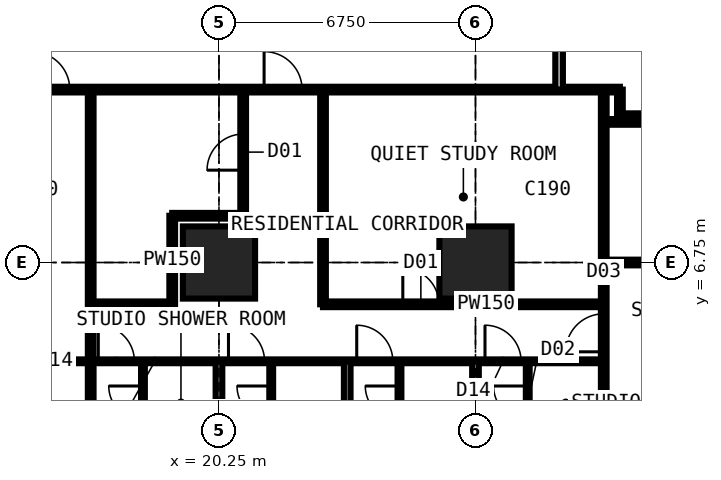
"""IFC4 building model, lengths in metres.
Left out: names, types, materials, properties, quantities, classifications, styles, units other than length and angle.
Written with IfcOpenShell. Run it as: python <this file> out.ifc"""

import sys

from ifc_helpers import new_model, si_unit, direction, frame, frame_2d, origin, origin_2d, place, context, subcontext, project, spatial, rectangle, extrude, element, fill, save


model = new_model("IFC4")
c1 = context("Model", 3, precision=1e-05, world=origin(), true_north=direction((0.0, 1.0)))
c2 = subcontext(c1, "Body", "Model", "MODEL_VIEW")
j1 = project(units=[si_unit("LENGTHUNIT", "METRE"), si_unit("PLANEANGLEUNIT", "RADIAN")], contexts=[c1])
p1 = place(None, origin())
s1 = spatial("IfcSite", under=j1, at=p1, CompositionType="ELEMENT")
p2 = place(p1, origin())
s2 = spatial("IfcBuilding", under=s1, at=p2, CompositionType="ELEMENT")
p3 = place(p2, frame((0.0, 0.0, 36.0)))
s3 = spatial("IfcBuildingStorey", under=s2, at=p3, CompositionType="ELEMENT", Elevation=36.0)
for number, where, z_axis, x_axis in (
    (1, (20.25, 6.75, 0.0), (0.0, 0.0, 1.0), (1.0, 0.0, 0.0)),
    (2, (27.0, 6.75, 0.0), (0.0, 0.0, 1.0), (1.0, 0.0, 0.0)),
):
    element("IfcColumn", number, at=place(p3, frame(where, z_axis=z_axis, x_axis=x_axis)), inside=s3, PredefinedType="COLUMN", context=c2, shape_type="SweptSolid", body=[
        extrude(rectangle(XDim=1.9, YDim=1.9, at=origin_2d()), origin(), (0.0, 0.0, 1.0), 3.6),
    ])
p4 = place(p3, frame((6.75, 4.15, 0.0), z_axis=(0.0, 0.0, 1.0), x_axis=(1.0, 0.0, 0.0)))
e3 = element("IfcWall", 3, at=p4, inside=s3, PredefinedType="PARTITIONING", context=c2, shape_type="SweptSolid", body=[
    extrude(rectangle(XDim=23.625, YDim=0.1, at=frame_2d((11.812, 0.0))), origin(), (0.0, 0.0, 1.0), 3.375),
])
p5 = place(p4, frame((0.2, 0.0, 0.0)))
e4 = element("IfcOpeningElement", 4, at=p5, cuts=e3, PredefinedType="OPENING", context=c2, shape_type="SweptSolid", body=[
    extrude(rectangle(XDim=0.95, YDim=2.2, at=frame_2d((0.475, 1.1))), frame((0.0, 0.06, 0.0), z_axis=(0.0, -1.0, 0.0), x_axis=(1.0, 0.0, 0.0)), (0.0, 0.0, 1.0), 0.12),
])
p6 = place(p4, frame((3.625, 0.0, 0.0)))
e5 = element("IfcOpeningElement", 5, at=p6, cuts=e3, PredefinedType="OPENING", context=c2, shape_type="SweptSolid", body=[
    extrude(rectangle(XDim=0.95, YDim=2.2, at=frame_2d((0.475, 1.1))), frame((0.0, 0.06, 0.0), z_axis=(0.0, -1.0, 0.0), x_axis=(1.0, 0.0, 0.0)), (0.0, 0.0, 1.0), 0.12),
])
p7 = place(p4, frame((7.0, 0.0, 0.0)))
e6 = element("IfcOpeningElement", 6, at=p7, cuts=e3, PredefinedType="OPENING", context=c2, shape_type="SweptSolid", body=[
    extrude(rectangle(XDim=0.95, YDim=2.2, at=frame_2d((0.475, 1.1))), frame((0.0, 0.06, 0.0), z_axis=(0.0, -1.0, 0.0), x_axis=(1.0, 0.0, 0.0)), (0.0, 0.0, 1.0), 0.12),
])
p8 = place(p4, frame((10.325, 0.0, 0.0)))
e7 = element("IfcOpeningElement", 7, at=p8, cuts=e3, PredefinedType="OPENING", context=c2, shape_type="SweptSolid", body=[
    extrude(rectangle(XDim=0.95, YDim=2.2, at=frame_2d((0.475, 1.1))), frame((0.0, 0.06, 0.0), z_axis=(0.0, -1.0, 0.0), x_axis=(1.0, 0.0, 0.0)), (0.0, 0.0, 1.0), 0.12),
])
p9 = place(p4, frame((13.75, 0.0, 0.0)))
e8 = element("IfcOpeningElement", 8, at=p9, cuts=e3, PredefinedType="OPENING", context=c2, shape_type="SweptSolid", body=[
    extrude(rectangle(XDim=0.95, YDim=2.2, at=frame_2d((0.475, 1.1))), frame((0.0, 0.06, 0.0), z_axis=(0.0, -1.0, 0.0), x_axis=(1.0, 0.0, 0.0)), (0.0, 0.0, 1.0), 0.12),
])
p10 = place(p4, frame((17.125, 0.0, 0.0)))
e9 = element("IfcOpeningElement", 9, at=p10, cuts=e3, PredefinedType="OPENING", context=c2, shape_type="SweptSolid", body=[
    extrude(rectangle(XDim=0.95, YDim=2.2, at=frame_2d((0.475, 1.1))), frame((0.0, 0.06, 0.0), z_axis=(0.0, -1.0, 0.0), x_axis=(1.0, 0.0, 0.0)), (0.0, 0.0, 1.0), 0.12),
])
p11 = place(p4, frame((20.5, 0.0, 0.0)))
e10 = element("IfcOpeningElement", 10, at=p11, cuts=e3, PredefinedType="OPENING", context=c2, shape_type="SweptSolid", body=[
    extrude(rectangle(XDim=0.95, YDim=2.2, at=frame_2d((0.475, 1.1))), frame((0.0, 0.06, 0.0), z_axis=(0.0, -1.0, 0.0), x_axis=(1.0, 0.0, 0.0)), (0.0, 0.0, 1.0), 0.12),
])
p12 = place(p3, frame((10.125, 11.3, 0.0), z_axis=(0.0, 0.0, 1.0), x_axis=(1.0, 0.0, 0.0)))
e11 = element("IfcWall", 11, at=p12, inside=s3, PredefinedType="PARTITIONING", context=c2, shape_type="SweptSolid", body=[
    extrude(rectangle(XDim=20.675, YDim=0.15, at=frame_2d((10.337, 0.0))), origin(), (0.0, 0.0, 1.0), 3.375),
])
p13 = place(p12, frame((5.2, 0.0, 0.0)))
e12 = element("IfcOpeningElement", 12, at=p13, cuts=e11, PredefinedType="OPENING", context=c2, shape_type="SweptSolid", body=[
    extrude(rectangle(XDim=1.0, YDim=2.2, at=frame_2d((0.5, 1.1))), frame((0.0, 0.085, 0.0), z_axis=(0.0, -1.0, 0.0), x_axis=(1.0, 0.0, 0.0)), (0.0, 0.0, 1.0), 0.17),
])
p14 = place(p12, frame((11.312, 0.0, 0.0)))
e13 = element("IfcOpeningElement", 13, at=p14, cuts=e11, PredefinedType="OPENING", context=c2, shape_type="SweptSolid", body=[
    extrude(rectangle(XDim=1.0, YDim=2.2, at=frame_2d((0.5, 1.1))), frame((0.0, 0.085, 0.0), z_axis=(0.0, -1.0, 0.0), x_axis=(1.0, 0.0, 0.0)), (0.0, 0.0, 1.0), 0.17),
])
p15 = place(p12, frame((2.425, 0.0, 0.0)))
e14 = element("IfcOpeningElement", 14, at=p15, cuts=e11, PredefinedType="OPENING", context=c2, shape_type="SweptSolid", body=[
    extrude(rectangle(XDim=0.95, YDim=2.2, at=frame_2d((0.475, 1.1))), frame((0.0, 0.085, 0.0), z_axis=(0.0, -1.0, 0.0), x_axis=(1.0, 0.0, 0.0)), (0.0, 0.0, 1.0), 0.17),
])
p16 = place(p3, frame((16.875, -0.734, 0.0), z_axis=(0.0, 0.0, 1.0), x_axis=(0.0, 1.0, 0.0)))
e15 = element("IfcWall", 15, at=p16, inside=s3, PredefinedType="PARTITIONING", context=c2, shape_type="SweptSolid", body=[
    extrude(rectangle(XDim=12.034, YDim=0.15, at=frame_2d((6.017, 0.0))), origin(), (0.0, 0.0, 1.0), 3.375),
])
p17 = place(p3, frame((16.875, 5.65, 0.0), z_axis=(0.0, 0.0, 1.0), x_axis=(1.0, 0.0, 0.0)))
e16 = element("IfcWall", 16, at=p17, inside=s3, PredefinedType="PARTITIONING", context=c2, shape_type="SweptSolid", body=[
    extrude(rectangle(XDim=2.145, YDim=0.15, at=frame_2d((1.073, 0.0))), origin(), (0.0, 0.0, 1.0), 3.375),
])
p18 = place(p3, frame((18.25, 1.95, 0.0), z_axis=(0.0, 0.0, 1.0), x_axis=(0.0, 1.0, 0.0)))
e17 = element("IfcWall", 17, at=p18, inside=s3, PredefinedType="PARTITIONING", context=c2, shape_type="SweptSolid", body=[
    extrude(rectangle(XDim=2.2, YDim=0.1, at=frame_2d((1.1, 0.0))), origin(), (0.0, 0.0, 1.0), 3.375),
])
p19 = place(p18, frame((0.65, 0.0, 0.0)))
e18 = element("IfcOpeningElement", 18, at=p19, cuts=e17, PredefinedType="OPENING", context=c2, shape_type="SweptSolid", body=[
    extrude(rectangle(XDim=0.9, YDim=2.2, at=frame_2d((0.45, 1.1))), frame((0.0, 0.06, 0.0), z_axis=(0.0, -1.0, 0.0), x_axis=(1.0, 0.0, 0.0)), (0.0, 0.0, 1.0), 0.12),
])
p20 = place(p3, frame((19.02, 5.65, 0.0), z_axis=(0.0, 0.0, 1.0), x_axis=(0.0, 1.0, 0.0)))
e19 = element("IfcWall", 19, at=p20, inside=s3, PredefinedType="PARTITIONING", context=c2, shape_type="SweptSolid", body=[
    extrude(rectangle(XDim=2.33, YDim=0.15, at=frame_2d((1.165, 0.0))), origin(), (0.0, 0.0, 1.0), 3.375),
])
p21 = place(p3, frame((19.02, 7.98, 0.0), z_axis=(0.0, 0.0, 1.0), x_axis=(1.0, 0.0, 0.0)))
e20 = element("IfcWall", 20, at=p21, inside=s3, PredefinedType="PARTITIONING", context=c2, shape_type="SweptSolid", body=[
    extrude(rectangle(XDim=1.867, YDim=0.15, at=frame_2d((0.934, 0.0))), origin(), (0.0, 0.0, 1.0), 3.375),
])
p22 = place(p3, frame((20.25, -0.734, 0.0), z_axis=(0.0, 0.0, 1.0), x_axis=(0.0, 1.0, 0.0)))
e21 = element("IfcWall", 21, at=p22, inside=s3, PredefinedType="PARTITIONING", context=c2, shape_type="SweptSolid", body=[
    extrude(rectangle(XDim=4.884, YDim=0.175, at=frame_2d((2.442, 0.0))), origin(), (0.0, 0.0, 1.0), 2.61),
])
p23 = place(p3, frame((20.887, 7.98, 0.0), z_axis=(0.0, 0.0, 1.0), x_axis=(0.0, 1.0, 0.0)))
e22 = element("IfcWall", 22, at=p23, inside=s3, PredefinedType="PARTITIONING", context=c2, shape_type="SweptSolid", body=[
    extrude(rectangle(XDim=3.32, YDim=0.15, at=frame_2d((1.66, 0.0))), origin(), (0.0, 0.0, 1.0), 3.375),
])
p24 = place(p23, frame((1.2, 0.0, 0.0)))
e23 = element("IfcOpeningElement", 23, at=p24, cuts=e22, PredefinedType="OPENING", context=c2, shape_type="SweptSolid", body=[
    extrude(rectangle(XDim=0.95, YDim=2.2, at=frame_2d((0.475, 1.1))), frame((0.0, 0.085, 0.0), z_axis=(0.0, -1.0, 0.0), x_axis=(1.0, 0.0, 0.0)), (0.0, 0.0, 1.0), 0.17),
])
p25 = place(p3, frame((21.625, 1.95, 0.0), z_axis=(0.0, 0.0, 1.0), x_axis=(0.0, 1.0, 0.0)))
e24 = element("IfcWall", 24, at=p25, inside=s3, PredefinedType="PARTITIONING", context=c2, shape_type="SweptSolid", body=[
    extrude(rectangle(XDim=2.2, YDim=0.1, at=frame_2d((1.1, 0.0))), origin(), (0.0, 0.0, 1.0), 3.375),
])
p26 = place(p25, frame((0.65, 0.0, 0.0)))
e25 = element("IfcOpeningElement", 25, at=p26, cuts=e24, PredefinedType="OPENING", context=c2, shape_type="SweptSolid", body=[
    extrude(rectangle(XDim=0.9, YDim=2.2, at=frame_2d((0.45, 1.1))), frame((0.0, 0.06, 0.0), z_axis=(0.0, -1.0, 0.0), x_axis=(1.0, 0.0, 0.0)), (0.0, 0.0, 1.0), 0.12),
])
p27 = place(p3, frame((22.988, 5.65, 0.0), z_axis=(0.0, 0.0, 1.0), x_axis=(1.0, 0.0, 0.0)))
e26 = element("IfcWall", 26, at=p27, inside=s3, PredefinedType="PARTITIONING", context=c2, shape_type="SweptSolid", body=[
    extrude(rectangle(XDim=7.387, YDim=0.15, at=frame_2d((3.694, 0.0))), origin(), (0.0, 0.0, 1.0), 3.375),
])
p28 = place(p27, frame((2.1, 0.0, 0.0)))
e27 = element("IfcOpeningElement", 27, at=p28, cuts=e26, PredefinedType="OPENING", context=c2, shape_type="SweptSolid", body=[
    extrude(rectangle(XDim=0.95, YDim=2.2, at=frame_2d((0.475, 1.1))), frame((0.0, 0.085, 0.0), z_axis=(0.0, -1.0, 0.0), x_axis=(1.0, 0.0, 0.0)), (0.0, 0.0, 1.0), 0.17),
])
p29 = place(p3, frame((22.988, 5.65, 0.0), z_axis=(0.0, 0.0, 1.0), x_axis=(0.0, 1.0, 0.0)))
e28 = element("IfcWall", 28, at=p29, inside=s3, PredefinedType="PARTITIONING", context=c2, shape_type="SweptSolid", body=[
    extrude(rectangle(XDim=5.65, YDim=0.15, at=frame_2d((2.825, 0.0))), origin(), (0.0, 0.0, 1.0), 3.375),
])
p30 = place(p3, frame((23.625, -0.734, 0.0), z_axis=(0.0, 0.0, 1.0), x_axis=(0.0, 1.0, 0.0)))
e29 = element("IfcWall", 29, at=p30, inside=s3, PredefinedType="PARTITIONING", context=c2, shape_type="SweptSolid", body=[
    extrude(rectangle(XDim=4.884, YDim=0.175, at=frame_2d((2.442, 0.0))), origin(), (0.0, 0.0, 1.0), 3.375),
])
p31 = place(p3, frame((25.0, 1.95, 0.0), z_axis=(0.0, 0.0, 1.0), x_axis=(0.0, 1.0, 0.0)))
e30 = element("IfcWall", 30, at=p31, inside=s3, PredefinedType="PARTITIONING", context=c2, shape_type="SweptSolid", body=[
    extrude(rectangle(XDim=2.2, YDim=0.1, at=frame_2d((1.1, 0.0))), origin(), (0.0, 0.0, 1.0), 3.375),
])
p32 = place(p31, frame((0.65, 0.0, 0.0)))
e31 = element("IfcOpeningElement", 31, at=p32, cuts=e30, PredefinedType="OPENING", context=c2, shape_type="SweptSolid", body=[
    extrude(rectangle(XDim=0.9, YDim=2.2, at=frame_2d((0.45, 1.1))), frame((0.0, 0.06, 0.0), z_axis=(0.0, -1.0, 0.0), x_axis=(1.0, 0.0, 0.0)), (0.0, 0.0, 1.0), 0.12),
])
p33 = place(p3, frame((27.0, -0.734, 0.0), z_axis=(0.0, 0.0, 1.0), x_axis=(0.0, 1.0, 0.0)))
e32 = element("IfcWall", 32, at=p33, inside=s3, PredefinedType="PARTITIONING", context=c2, shape_type="SweptSolid", body=[
    extrude(rectangle(XDim=4.884, YDim=0.175, at=frame_2d((2.442, 0.0))), origin(), (0.0, 0.0, 1.0), 2.877),
])
p34 = place(p3, frame((28.375, 1.95, 0.0), z_axis=(0.0, 0.0, 1.0), x_axis=(0.0, 1.0, 0.0)))
e33 = element("IfcWall", 33, at=p34, inside=s3, PredefinedType="PARTITIONING", context=c2, shape_type="SweptSolid", body=[
    extrude(rectangle(XDim=2.2, YDim=0.1, at=frame_2d((1.1, 0.0))), origin(), (0.0, 0.0, 1.0), 3.375),
])
p35 = place(p34, frame((0.65, 0.0, 0.0)))
e34 = element("IfcOpeningElement", 34, at=p35, cuts=e33, PredefinedType="OPENING", context=c2, shape_type="SweptSolid", body=[
    extrude(rectangle(XDim=0.9, YDim=2.2, at=frame_2d((0.45, 1.1))), frame((0.0, 0.06, 0.0), z_axis=(0.0, -1.0, 0.0), x_axis=(1.0, 0.0, 0.0)), (0.0, 0.0, 1.0), 0.12),
])
p36 = place(p3, frame((29.2, 11.3, 0.0), z_axis=(0.0, 0.0, 1.0), x_axis=(0.0, 1.0, 0.0)))
e35 = element("IfcWall", 35, at=p36, inside=s3, PredefinedType="PARTITIONING", context=c2, shape_type="SweptSolid", body=[
    extrude(rectangle(XDim=17.9, YDim=0.2, at=frame_2d((8.95, 0.0))), origin(), (0.0, 0.0, 1.0), 3.375),
])
p37 = place(p36, frame((8.35, 0.0, 0.0)))
e36 = element("IfcOpeningElement", 36, at=p37, cuts=e35, PredefinedType="OPENING", context=c2, shape_type="SweptSolid", body=[
    extrude(rectangle(XDim=1.2, YDim=2.2, at=frame_2d((0.6, 1.1))), frame((0.0, 0.11, 0.0), z_axis=(0.0, -1.0, 0.0), x_axis=(1.0, 0.0, 0.0)), (0.0, 0.0, 1.0), 0.22),
])
p38 = place(p3, frame((30.375, -0.734, 0.0), z_axis=(0.0, 0.0, 1.0), x_axis=(0.0, 1.0, 0.0)))
e37 = element("IfcWall", 37, at=p38, inside=s3, PredefinedType="PARTITIONING", context=c2, shape_type="SweptSolid", body=[
    extrude(rectangle(XDim=12.034, YDim=0.15, at=frame_2d((6.017, 0.0))), origin(), (0.0, 0.0, 1.0), 3.375),
])
p39 = place(p38, frame((5.134, 0.0, 0.0)))
e38 = element("IfcOpeningElement", 38, at=p39, cuts=e37, PredefinedType="OPENING", context=c2, shape_type="SweptSolid", body=[
    extrude(rectangle(XDim=1.0, YDim=2.2, at=frame_2d((0.5, 1.1))), frame((0.0, 0.085, 0.0), z_axis=(0.0, -1.0, 0.0), x_axis=(1.0, 0.0, 0.0)), (0.0, 0.0, 1.0), 0.17),
])
p40 = place(p3, frame((30.375, 6.75, 0.0), z_axis=(0.0, 0.0, 1.0), x_axis=(1.0, 0.0, 0.0)))
e39 = element("IfcWall", 39, at=p40, inside=s3, PredefinedType="PARTITIONING", context=c2, shape_type="SweptSolid", body=[
    extrude(rectangle(XDim=5.975, YDim=0.15, at=frame_2d((2.988, 0.0))), origin(), (0.0, 0.0, 1.0), 2.877),
])
p41 = place(p3, frame((30.375, 10.45, 0.0), z_axis=(0.0, 0.0, 1.0), x_axis=(1.0, 0.0, 0.0)))
e40 = element("IfcWall", 40, at=p41, inside=s3, PredefinedType="PARTITIONING", context=c2, shape_type="SweptSolid", body=[
    extrude(rectangle(XDim=4.475, YDim=0.15, at=frame_2d((2.238, 0.0))), origin(), (0.0, 0.0, 1.0), 3.375),
])
p42 = place(p41, frame((2.35, 0.0, 0.0)))
e41 = element("IfcOpeningElement", 41, at=p42, cuts=e40, PredefinedType="OPENING", context=c2, shape_type="SweptSolid", body=[
    extrude(rectangle(XDim=0.95, YDim=2.2, at=frame_2d((0.475, 1.1))), frame((0.0, 0.085, 0.0), z_axis=(0.0, -1.0, 0.0), x_axis=(1.0, 0.0, 0.0)), (0.0, 0.0, 1.0), 0.17),
])
p43 = place(p3, frame((30.8, 10.6, 0.0), z_axis=(0.0, 0.0, 1.0), x_axis=(0.0, 1.0, 0.0)))
e42 = element("IfcWall", 42, at=p43, inside=s3, PredefinedType="PARTITIONING", context=c2, shape_type="SweptSolid", body=[
    extrude(rectangle(XDim=0.7, YDim=0.15, at=frame_2d((0.35, 0.0))), origin(), (0.0, 0.0, 1.0), 3.375),
])
p44 = place(p3, frame((30.8, 10.6, 0.0), z_axis=(0.0, 0.0, 1.0), x_axis=(1.0, 0.0, 0.0)))
e43 = element("IfcWall", 43, at=p44, inside=s3, PredefinedType="PARTITIONING", context=c2, shape_type="SweptSolid", body=[
    extrude(rectangle(XDim=1.85, YDim=0.15, at=frame_2d((0.925, 0.0))), origin(), (0.0, 0.0, 1.0), 3.375),
])
p45 = place(p13, origin())
e44 = element("IfcDoor", 44, at=p45, inside=s3, OperationType="SINGLE_SWING_LEFT", PredefinedType="DOOR", context=c2, shape_type="SweptSolid", body=[
    extrude(rectangle(XDim=1.0, YDim=2.2, at=frame_2d((0.5, 1.1))), frame((0.0, 0.025, 0.0), z_axis=(0.0, -1.0, 0.0), x_axis=(1.0, 0.0, 0.0)), (0.0, 0.0, 1.0), 0.05),
])
fill(e12, e44)
p46 = place(p8, origin())
e45 = element("IfcDoor", 45, at=p46, inside=s3, OperationType="SINGLE_SWING_LEFT", PredefinedType="DOOR", context=c2, shape_type="SweptSolid", body=[
    extrude(rectangle(XDim=0.95, YDim=2.2, at=frame_2d((0.475, 1.1))), frame((0.0, 0.025, 0.0), z_axis=(0.0, -1.0, 0.0), x_axis=(1.0, 0.0, 0.0)), (0.0, 0.0, 1.0), 0.05),
])
fill(e7, e45)
p47 = place(p19, origin())
e46 = element("IfcDoor", 46, at=p47, inside=s3, OperationType="SINGLE_SWING_RIGHT", PredefinedType="DOOR", context=c2, shape_type="SweptSolid", body=[
    extrude(rectangle(XDim=0.9, YDim=2.2, at=frame_2d((0.45, 1.1))), frame((0.0, 0.025, 0.0), z_axis=(0.0, -1.0, 0.0), x_axis=(1.0, 0.0, 0.0)), (0.0, 0.0, 1.0), 0.05),
])
fill(e18, e46)
p48 = place(p9, origin())
e47 = element("IfcDoor", 47, at=p48, inside=s3, OperationType="SINGLE_SWING_LEFT", PredefinedType="DOOR", context=c2, shape_type="SweptSolid", body=[
    extrude(rectangle(XDim=0.95, YDim=2.2, at=frame_2d((0.475, 1.1))), frame((0.0, 0.025, 0.0), z_axis=(0.0, -1.0, 0.0), x_axis=(1.0, 0.0, 0.0)), (0.0, 0.0, 1.0), 0.05),
])
fill(e8, e47)
p49 = place(p26, origin())
e48 = element("IfcDoor", 48, at=p49, inside=s3, OperationType="SINGLE_SWING_RIGHT", PredefinedType="DOOR", context=c2, shape_type="SweptSolid", body=[
    extrude(rectangle(XDim=0.9, YDim=2.2, at=frame_2d((0.45, 1.1))), frame((0.0, 0.025, 0.0), z_axis=(0.0, -1.0, 0.0), x_axis=(1.0, 0.0, 0.0)), (0.0, 0.0, 1.0), 0.05),
])
fill(e25, e48)
p50 = place(p10, origin())
e49 = element("IfcDoor", 49, at=p50, inside=s3, OperationType="SINGLE_SWING_LEFT", PredefinedType="DOOR", context=c2, shape_type="SweptSolid", body=[
    extrude(rectangle(XDim=0.95, YDim=2.2, at=frame_2d((0.475, 1.1))), frame((0.0, 0.025, 0.0), z_axis=(0.0, -1.0, 0.0), x_axis=(1.0, 0.0, 0.0)), (0.0, 0.0, 1.0), 0.05),
])
fill(e9, e49)
p51 = place(p32, origin())
e50 = element("IfcDoor", 50, at=p51, inside=s3, OperationType="SINGLE_SWING_RIGHT", PredefinedType="DOOR", context=c2, shape_type="SweptSolid", body=[
    extrude(rectangle(XDim=0.9, YDim=2.2, at=frame_2d((0.45, 1.1))), frame((0.0, 0.025, 0.0), z_axis=(0.0, -1.0, 0.0), x_axis=(1.0, 0.0, 0.0)), (0.0, 0.0, 1.0), 0.05),
])
fill(e31, e50)
p52 = place(p11, origin())
e51 = element("IfcDoor", 51, at=p52, inside=s3, OperationType="SINGLE_SWING_LEFT", PredefinedType="DOOR", context=c2, shape_type="SweptSolid", body=[
    extrude(rectangle(XDim=0.95, YDim=2.2, at=frame_2d((0.475, 1.1))), frame((0.0, 0.025, 0.0), z_axis=(0.0, -1.0, 0.0), x_axis=(1.0, 0.0, 0.0)), (0.0, 0.0, 1.0), 0.05),
])
fill(e10, e51)
p53 = place(p35, origin())
e52 = element("IfcDoor", 52, at=p53, inside=s3, OperationType="SINGLE_SWING_RIGHT", PredefinedType="DOOR", context=c2, shape_type="SweptSolid", body=[
    extrude(rectangle(XDim=0.9, YDim=2.2, at=frame_2d((0.45, 1.1))), frame((0.0, 0.025, 0.0), z_axis=(0.0, -1.0, 0.0), x_axis=(1.0, 0.0, 0.0)), (0.0, 0.0, 1.0), 0.05),
])
fill(e34, e52)
p54 = place(p14, origin())
e53 = element("IfcDoor", 53, at=p54, inside=s3, OperationType="SINGLE_SWING_LEFT", PredefinedType="DOOR", context=c2, shape_type="SweptSolid", body=[
    extrude(rectangle(XDim=1.0, YDim=2.2, at=frame_2d((0.5, 1.1))), frame((0.0, 0.025, 0.0), z_axis=(0.0, -1.0, 0.0), x_axis=(1.0, 0.0, 0.0)), (0.0, 0.0, 1.0), 0.05),
])
fill(e13, e53)
p55 = place(p28, origin())
e54 = element("IfcDoor", 54, at=p55, inside=s3, OperationType="SINGLE_SWING_LEFT", PredefinedType="DOOR", context=c2, shape_type="SweptSolid", body=[
    extrude(rectangle(XDim=0.95, YDim=2.2, at=frame_2d((0.475, 1.1))), frame((0.0, 0.025, 0.0), z_axis=(0.0, -1.0, 0.0), x_axis=(1.0, 0.0, 0.0)), (0.0, 0.0, 1.0), 0.05),
])
fill(e27, e54)
p56 = place(p24, origin())
e55 = element("IfcDoor", 55, at=p56, inside=s3, OperationType="SINGLE_SWING_LEFT", PredefinedType="DOOR", context=c2, shape_type="SweptSolid", body=[
    extrude(rectangle(XDim=0.95, YDim=2.2, at=frame_2d((0.475, 1.1))), frame((0.0, 0.025, 0.0), z_axis=(0.0, -1.0, 0.0), x_axis=(1.0, 0.0, 0.0)), (0.0, 0.0, 1.0), 0.05),
])
fill(e23, e55)
p57 = place(p39, origin())
e56 = element("IfcDoor", 56, at=p57, inside=s3, OperationType="SINGLE_SWING_LEFT", PredefinedType="DOOR", context=c2, shape_type="SweptSolid", body=[
    extrude(rectangle(XDim=1.0, YDim=2.2, at=frame_2d((0.5, 1.1))), frame((0.0, 0.025, 0.0), z_axis=(0.0, -1.0, 0.0), x_axis=(1.0, 0.0, 0.0)), (0.0, 0.0, 1.0), 0.05),
])
fill(e38, e56)
save(model, sys.argv[1])
